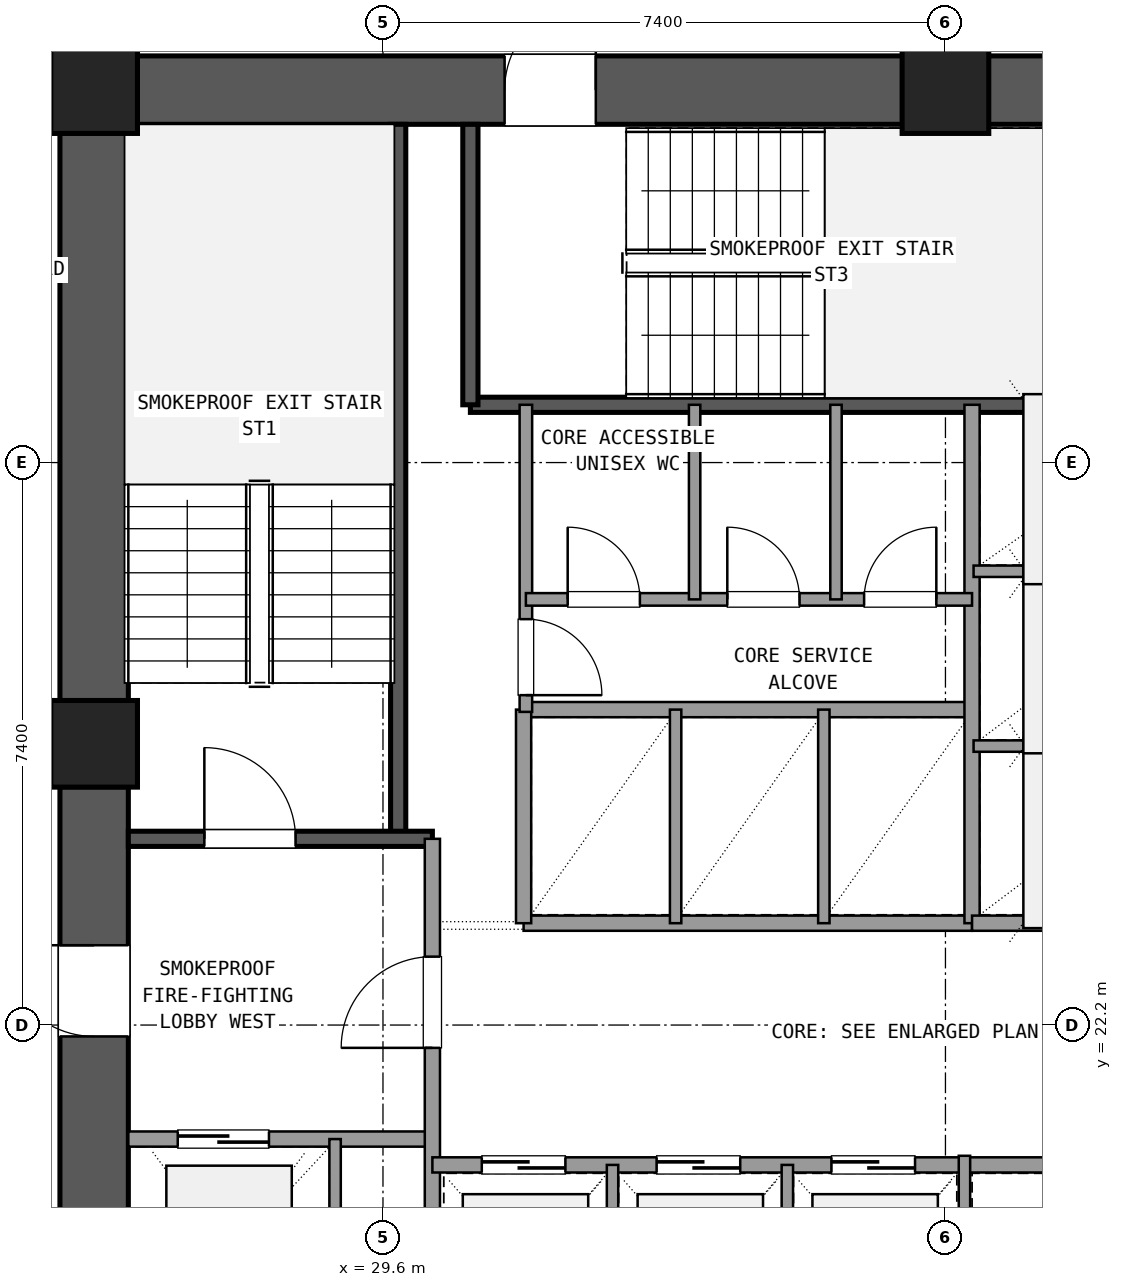
"""IFC4 building model, lengths in metres.
Left out: names, types, materials, properties, quantities, classifications, styles, units other than length and angle.
Written with IfcOpenShell. Run it as: python <this file> out.ifc"""

import sys

from ifc_helpers import new_model, si_unit, direction, frame, frame_2d, origin, origin_2d, place, context, subcontext, project, spatial, rectangle, extrude, element, fill, save


model = new_model("IFC4")
c1 = context("Model", 3, precision=1e-05, world=origin(), true_north=direction((0.0, 1.0)))
c2 = subcontext(c1, "Body", "Model", "MODEL_VIEW")
j1 = project(units=[si_unit("LENGTHUNIT", "METRE"), si_unit("PLANEANGLEUNIT", "RADIAN")], contexts=[c1])
p1 = place(None, origin())
s1 = spatial("IfcSite", under=j1, at=p1, CompositionType="ELEMENT")
p2 = place(p1, origin())
s2 = spatial("IfcBuilding", under=s1, at=p2, CompositionType="ELEMENT")
p3 = place(p2, frame((0.0, 0.0, 52.74)))
s3 = spatial("IfcBuildingStorey", under=s2, at=p3, CompositionType="ELEMENT", Elevation=52.74)
for number, where, z_axis, x_axis in (
    (1, (37.0, 34.5, 0.0), (0.0, 0.0, 1.0), (1.0, 0.0, 0.0)),
    (2, (25.8, 34.5, 0.0), (0.0, 0.0, 1.0), (1.0, 0.0, 0.0)),
    (3, (25.8, 25.9, 0.0), (0.0, 0.0, 1.0), (1.0, 0.0, 0.0)),
):
    element("IfcColumn", number, at=place(p3, frame(where, z_axis=z_axis, x_axis=x_axis)), inside=s3, PredefinedType="COLUMN", context=c2, shape_type="SweptSolid", body=[
        extrude(rectangle(XDim=1.14, YDim=1.14, at=origin_2d()), origin(), (0.0, 0.0, 1.0), 3.6),
    ])
p4 = place(p3, frame((47.635, 34.5, 0.0), z_axis=(0.0, 0.0, 1.0), x_axis=(-1.0, 0.0, 0.0)))
e4 = element("IfcWall", 4, at=p4, inside=s3, PredefinedType="SHEAR", context=c2, shape_type="SweptSolid", body=[
    extrude(rectangle(XDim=10.07, YDim=0.9, at=frame_2d((5.035, 0.0))), origin(), (0.0, 0.0, 1.0), 3.32),
])
p5 = place(p4, frame((4.535, 0.0, 0.0)))
e5 = element("IfcOpeningElement", 5, at=p5, cuts=e4, PredefinedType="OPENING", context=c2, shape_type="SweptSolid", body=[
    extrude(rectangle(XDim=1.6, YDim=2.2, at=frame_2d((0.8, 1.1))), frame((0.0, 0.46, 0.0), z_axis=(0.0, -1.0, 0.0), x_axis=(1.0, 0.0, 0.0)), (0.0, 0.0, 1.0), 0.92),
])
p6 = place(p3, frame((36.435, 34.5, 0.0), z_axis=(0.0, 0.0, 1.0), x_axis=(-1.0, 0.0, 0.0)))
e6 = element("IfcWall", 6, at=p6, inside=s3, PredefinedType="SHEAR", context=c2, shape_type="SweptSolid", body=[
    extrude(rectangle(XDim=10.07, YDim=0.9, at=frame_2d((5.035, 0.0))), origin(), (0.0, 0.0, 1.0), 3.32),
])
p7 = place(p6, frame((4.035, 0.0, 0.0)))
e7 = element("IfcOpeningElement", 7, at=p7, cuts=e6, PredefinedType="OPENING", context=c2, shape_type="SweptSolid", body=[
    extrude(rectangle(XDim=1.2, YDim=2.15, at=frame_2d((0.6, 1.075))), frame((0.0, 0.46, 0.0), z_axis=(0.0, -1.0, 0.0), x_axis=(1.0, 0.0, 0.0)), (0.0, 0.0, 1.0), 0.92),
])
p8 = place(p3, frame((25.8, 33.935, 0.0), z_axis=(0.0, 0.0, 1.0), x_axis=(0.0, -1.0, 0.0)))
e8 = element("IfcWall", 8, at=p8, inside=s3, PredefinedType="SHEAR", context=c2, shape_type="SweptSolid", body=[
    extrude(rectangle(XDim=7.47, YDim=0.9, at=frame_2d((3.735, 0.0))), origin(), (0.0, 0.0, 1.0), 3.32),
])
p9 = place(p3, frame((25.8, 25.335, 0.0), z_axis=(0.0, 0.0, 1.0), x_axis=(0.0, -1.0, 0.0)))
e9 = element("IfcWall", 9, at=p9, inside=s3, PredefinedType="SHEAR", context=c2, shape_type="SweptSolid", body=[
    extrude(rectangle(XDim=7.47, YDim=0.9, at=frame_2d((3.735, 0.0))), origin(), (0.0, 0.0, 1.0), 3.32),
])
p10 = place(p9, frame((2.085, 0.0, 0.0)))
e10 = element("IfcOpeningElement", 10, at=p10, cuts=e9, PredefinedType="OPENING", context=c2, shape_type="SweptSolid", body=[
    extrude(rectangle(XDim=1.2, YDim=2.15, at=frame_2d((0.6, 1.075))), frame((0.0, 0.46, 0.0), z_axis=(0.0, -1.0, 0.0), x_axis=(1.0, 0.0, 0.0)), (0.0, 0.0, 1.0), 0.92),
])
p11 = place(p3, frame((29.8, 24.65, 0.0), z_axis=(0.0, 0.0, 1.0), x_axis=(0.0, 1.0, 0.0)))
e11 = element("IfcWall", 11, at=p11, inside=s3, PredefinedType="SHEAR", context=c2, shape_type="SweptSolid", body=[
    extrude(rectangle(XDim=9.4, YDim=0.2, at=frame_2d((4.7, 0.0))), origin(), (0.0, 0.0, 1.0), 3.32),
])
p12 = place(p3, frame((26.25, 24.65, 0.0), z_axis=(0.0, 0.0, 1.0), x_axis=(1.0, 0.0, 0.0)))
e12 = element("IfcWall", 12, at=p12, inside=s3, PredefinedType="SHEAR", context=c2, shape_type="SweptSolid", body=[
    extrude(rectangle(XDim=4.0, YDim=0.2, at=frame_2d((2.0, 0.0))), origin(), (0.0, 0.0, 1.0), 3.32),
])
p13 = place(p12, frame((1.0, 0.0, 0.0)))
e13 = element("IfcOpeningElement", 13, at=p13, cuts=e12, PredefinedType="OPENING", context=c2, shape_type="SweptSolid", body=[
    extrude(rectangle(XDim=1.2, YDim=2.15, at=frame_2d((0.6, 1.075))), frame((0.0, 0.11, 0.0), z_axis=(0.0, -1.0, 0.0), x_axis=(1.0, 0.0, 0.0)), (0.0, 0.0, 1.0), 0.22),
])
p14 = place(p3, frame((30.75, 30.36, 0.0), z_axis=(0.0, 0.0, 1.0), x_axis=(1.0, 0.0, 0.0)))
e14 = element("IfcWall", 14, at=p14, inside=s3, PredefinedType="SHEAR", context=c2, shape_type="SweptSolid", body=[
    extrude(rectangle(XDim=9.5, YDim=0.2, at=frame_2d((4.75, 0.0))), origin(), (0.0, 0.0, 1.0), 3.32),
])
p15 = place(p3, frame((30.75, 30.36, 0.0), z_axis=(0.0, 0.0, 1.0), x_axis=(0.0, 1.0, 0.0)))
e15 = element("IfcWall", 15, at=p15, inside=s3, PredefinedType="SHEAR", context=c2, shape_type="SweptSolid", body=[
    extrude(rectangle(XDim=3.69, YDim=0.2, at=frame_2d((1.845, 0.0))), origin(), (0.0, 0.0, 1.0), 3.32),
])
p16 = place(p3, frame((26.25, 20.7, 0.0), z_axis=(0.0, 0.0, 1.0), x_axis=(1.0, 0.0, 0.0)))
e16 = element("IfcWall", 16, at=p16, inside=s3, PredefinedType="SOLIDWALL", context=c2, shape_type="SweptSolid", body=[
    extrude(rectangle(XDim=4.0, YDim=0.2, at=frame_2d((2.0, 0.0))), origin(), (0.0, 0.0, 1.0), 2.61),
])
p17 = place(p16, frame((0.65, 0.0, 0.0)))
e17 = element("IfcOpeningElement", 17, at=p17, cuts=e16, PredefinedType="OPENING", context=c2, shape_type="SweptSolid", body=[
    extrude(rectangle(XDim=1.2, YDim=2.15, at=frame_2d((0.6, 1.075))), frame((0.0, 0.11, 0.0), z_axis=(0.0, -1.0, 0.0), x_axis=(1.0, 0.0, 0.0)), (0.0, 0.0, 1.0), 0.22),
])
p18 = place(p3, frame((30.25, 17.75, 0.0), z_axis=(0.0, 0.0, 1.0), x_axis=(0.0, 1.0, 0.0)))
e18 = element("IfcWall", 18, at=p18, inside=s3, PredefinedType="SOLIDWALL", context=c2, shape_type="SweptSolid", body=[
    extrude(rectangle(XDim=6.9, YDim=0.2, at=frame_2d((3.45, 0.0))), origin(), (0.0, 0.0, 1.0), 2.61),
])
p19 = place(p18, frame((4.15, 0.0, 0.0)))
e19 = element("IfcOpeningElement", 19, at=p19, cuts=e18, PredefinedType="OPENING", context=c2, shape_type="SweptSolid", body=[
    extrude(rectangle(XDim=1.2, YDim=2.15, at=frame_2d((0.6, 1.075))), frame((0.0, 0.11, 0.0), z_axis=(0.0, -1.0, 0.0), x_axis=(1.0, 0.0, 0.0)), (0.0, 0.0, 1.0), 0.22),
])
p20 = place(p3, frame((28.97, 17.75, 0.0), z_axis=(0.0, 0.0, 1.0), x_axis=(0.0, 1.0, 0.0)))
e20 = element("IfcWall", 20, at=p20, inside=s3, PredefinedType="PARTITIONING", context=c2, shape_type="SweptSolid", body=[
    extrude(rectangle(XDim=2.95, YDim=0.15, at=frame_2d((1.475, 0.0))), origin(), (0.0, 0.0, 1.0), 2.61),
])
p21 = place(p3, frame((30.25, 20.36, 0.0), z_axis=(0.0, 0.0, 1.0), x_axis=(1.0, 0.0, 0.0)))
e21 = element("IfcWall", 21, at=p21, inside=s3, PredefinedType="SOLIDWALL", context=c2, shape_type="SweptSolid", body=[
    extrude(rectangle(XDim=7.0, YDim=0.2, at=frame_2d((3.5, 0.0))), origin(), (0.0, 0.0, 1.0), 2.61),
])
p22 = place(p21, frame((0.65, 0.0, 0.0)))
e22 = element("IfcOpeningElement", 22, at=p22, cuts=e21, PredefinedType="OPENING", context=c2, shape_type="SweptSolid", body=[
    extrude(rectangle(XDim=1.1, YDim=2.15, at=frame_2d((0.55, 1.075))), frame((0.0, 0.11, 0.0), z_axis=(0.0, -1.0, 0.0), x_axis=(1.0, 0.0, 0.0)), (0.0, 0.0, 1.0), 0.22),
])
p23 = place(p21, frame((2.95, 0.0, 0.0)))
e23 = element("IfcOpeningElement", 23, at=p23, cuts=e21, PredefinedType="OPENING", context=c2, shape_type="SweptSolid", body=[
    extrude(rectangle(XDim=1.1, YDim=2.15, at=frame_2d((0.55, 1.075))), frame((0.0, 0.11, 0.0), z_axis=(0.0, -1.0, 0.0), x_axis=(1.0, 0.0, 0.0)), (0.0, 0.0, 1.0), 0.22),
])
p24 = place(p21, frame((5.25, 0.0, 0.0)))
e24 = element("IfcOpeningElement", 24, at=p24, cuts=e21, PredefinedType="OPENING", context=c2, shape_type="SweptSolid", body=[
    extrude(rectangle(XDim=1.1, YDim=2.15, at=frame_2d((0.55, 1.075))), frame((0.0, 0.11, 0.0), z_axis=(0.0, -1.0, 0.0), x_axis=(1.0, 0.0, 0.0)), (0.0, 0.0, 1.0), 0.22),
])
for number, where, z_axis, x_axis in (
    (25, (32.62, 17.75, 0.0), (0.0, 0.0, 1.0), (0.0, 1.0, 0.0)),
    (26, (34.92, 17.75, 0.0), (0.0, 0.0, 1.0), (0.0, 1.0, 0.0)),
):
    element("IfcWall", number, at=place(p3, frame(where, z_axis=z_axis, x_axis=x_axis)), inside=s3, PredefinedType="PARTITIONING", context=c2, shape_type="SweptSolid", body=[
        extrude(rectangle(XDim=2.61, YDim=0.15, at=frame_2d((1.305, 0.0))), origin(), (0.0, 0.0, 1.0), 2.61),
    ])
p25 = place(p3, frame((37.25, 20.36, 0.0), z_axis=(0.0, 0.0, 1.0), x_axis=(1.0, 0.0, 0.0)))
e27 = element("IfcWall", 27, at=p25, inside=s3, PredefinedType="SOLIDWALL", context=c2, shape_type="SweptSolid", body=[
    extrude(rectangle(XDim=6.1, YDim=0.2, at=frame_2d((3.05, 0.0))), origin(), (0.0, 0.0, 1.0), 2.61),
])
p26 = place(p3, frame((37.25, 17.75, 0.0), z_axis=(0.0, 0.0, 1.0), x_axis=(0.0, 1.0, 0.0)))
e28 = element("IfcWall", 28, at=p26, inside=s3, PredefinedType="PARTITIONING", context=c2, shape_type="SweptSolid", body=[
    extrude(rectangle(XDim=2.73, YDim=0.15, at=frame_2d((1.365, 0.0))), origin(), (0.0, 0.0, 1.0), 2.61),
])
for number, where, z_axis, x_axis in (
    (29, (31.45, 23.54, 0.0), (0.0, 0.0, 1.0), (1.0, 0.0, 0.0)),
    (30, (31.45, 26.35, 0.0), (0.0, 0.0, 1.0), (1.0, 0.0, 0.0)),
):
    element("IfcWall", number, at=place(p3, frame(where, z_axis=z_axis, x_axis=x_axis)), inside=s3, PredefinedType="SOLIDWALL", context=c2, shape_type="SweptSolid", body=[
        extrude(rectangle(XDim=5.9, YDim=0.2, at=frame_2d((2.95, 0.0))), origin(), (0.0, 0.0, 1.0), 2.61),
    ])
p27 = place(p3, frame((31.45, 23.54, 0.0), z_axis=(0.0, 0.0, 1.0), x_axis=(0.0, 1.0, 0.0)))
e31 = element("IfcWall", 31, at=p27, inside=s3, PredefinedType="SOLIDWALL", context=c2, shape_type="SweptSolid", body=[
    extrude(rectangle(XDim=2.81, YDim=0.2, at=frame_2d((1.405, 0.0))), origin(), (0.0, 0.0, 1.0), 2.61),
])
for number, where, z_axis, x_axis in (
    (32, (33.45, 23.54, 0.0), (0.0, 0.0, 1.0), (0.0, 1.0, 0.0)),
    (33, (35.4, 23.54, 0.0), (0.0, 0.0, 1.0), (0.0, 1.0, 0.0)),
):
    element("IfcWall", number, at=place(p3, frame(where, z_axis=z_axis, x_axis=x_axis)), inside=s3, PredefinedType="PARTITIONING", context=c2, shape_type="SweptSolid", body=[
        extrude(rectangle(XDim=2.81, YDim=0.15, at=frame_2d((1.405, 0.0))), origin(), (0.0, 0.0, 1.0), 2.61),
    ])
p28 = place(p3, frame((37.35, 23.54, 0.0), z_axis=(0.0, 0.0, 1.0), x_axis=(0.0, 1.0, 0.0)))
e34 = element("IfcWall", 34, at=p28, inside=s3, PredefinedType="SOLIDWALL", context=c2, shape_type="SweptSolid", body=[
    extrude(rectangle(XDim=6.82, YDim=0.2, at=frame_2d((3.41, 0.0))), origin(), (0.0, 0.0, 1.0), 2.61),
])
p29 = place(p3, frame((37.35, 23.54, 0.0), z_axis=(0.0, 0.0, 1.0), x_axis=(1.0, 0.0, 0.0)))
e35 = element("IfcWall", 35, at=p29, inside=s3, PredefinedType="SOLIDWALL", context=c2, shape_type="SweptSolid", body=[
    extrude(rectangle(XDim=3.05, YDim=0.2, at=frame_2d((1.525, 0.0))), origin(), (0.0, 0.0, 1.0), 2.61),
])
for number, where, z_axis, x_axis in (
    (36, (37.37, 25.87, 0.0), (0.0, 0.0, 1.0), (1.0, 0.0, 0.0)),
    (37, (37.37, 28.17, 0.0), (0.0, 0.0, 1.0), (1.0, 0.0, 0.0)),
):
    element("IfcWall", number, at=place(p3, frame(where, z_axis=z_axis, x_axis=x_axis)), inside=s3, PredefinedType="PARTITIONING", context=c2, shape_type="SweptSolid", body=[
        extrude(rectangle(XDim=3.01, YDim=0.15, at=frame_2d((1.505, 0.0))), origin(), (0.0, 0.0, 1.0), 2.61),
    ])
p30 = place(p3, frame((31.48, 26.32, 0.0), z_axis=(0.0, 0.0, 1.0), x_axis=(0.0, 1.0, 0.0)))
e38 = element("IfcWall", 38, at=p30, inside=s3, PredefinedType="PLUMBINGWALL", context=c2, shape_type="SweptSolid", body=[
    extrude(rectangle(XDim=4.04, YDim=0.165, at=frame_2d((2.02, 0.0))), origin(), (0.0, 0.0, 1.0), 2.61),
])
p31 = place(p30, frame((0.22, 0.0, 0.0)))
e39 = element("IfcOpeningElement", 39, at=p31, cuts=e38, PredefinedType="OPENING", context=c2, shape_type="SweptSolid", body=[
    extrude(rectangle(XDim=1.0, YDim=2.15, at=frame_2d((0.5, 1.075))), frame((0.0, 0.093, 0.0), z_axis=(0.0, -1.0, 0.0), x_axis=(1.0, 0.0, 0.0)), (0.0, 0.0, 1.0), 0.185),
])
p32 = place(p3, frame((31.48, 27.8, 0.0), z_axis=(0.0, 0.0, 1.0), x_axis=(1.0, 0.0, 0.0)))
e40 = element("IfcWall", 40, at=p32, inside=s3, PredefinedType="PLUMBINGWALL", context=c2, shape_type="SweptSolid", body=[
    extrude(rectangle(XDim=5.87, YDim=0.165, at=frame_2d((2.935, 0.0))), origin(), (0.0, 0.0, 1.0), 2.61),
])
p33 = place(p32, frame((0.55, 0.0, 0.0)))
e41 = element("IfcOpeningElement", 41, at=p33, cuts=e40, PredefinedType="OPENING", context=c2, shape_type="SweptSolid", body=[
    extrude(rectangle(XDim=0.95, YDim=2.1, at=frame_2d((0.475, 1.05))), frame((0.0, 0.093, 0.0), z_axis=(0.0, -1.0, 0.0), x_axis=(1.0, 0.0, 0.0)), (0.0, 0.0, 1.0), 0.185),
])
p34 = place(p32, frame((2.65, 0.0, 0.0)))
e42 = element("IfcOpeningElement", 42, at=p34, cuts=e40, PredefinedType="OPENING", context=c2, shape_type="SweptSolid", body=[
    extrude(rectangle(XDim=0.95, YDim=2.1, at=frame_2d((0.475, 1.05))), frame((0.0, 0.093, 0.0), z_axis=(0.0, -1.0, 0.0), x_axis=(1.0, 0.0, 0.0)), (0.0, 0.0, 1.0), 0.185),
])
p35 = place(p32, frame((4.45, 0.0, 0.0)))
e43 = element("IfcOpeningElement", 43, at=p35, cuts=e40, PredefinedType="OPENING", context=c2, shape_type="SweptSolid", body=[
    extrude(rectangle(XDim=0.95, YDim=2.1, at=frame_2d((0.475, 1.05))), frame((0.0, 0.093, 0.0), z_axis=(0.0, -1.0, 0.0), x_axis=(1.0, 0.0, 0.0)), (0.0, 0.0, 1.0), 0.185),
])
for number, where, z_axis, x_axis in (
    (44, (33.7, 27.8, 0.0), (0.0, 0.0, 1.0), (0.0, 1.0, 0.0)),
    (45, (35.56, 27.8, 0.0), (0.0, 0.0, 1.0), (0.0, 1.0, 0.0)),
):
    element("IfcWall", number, at=place(p3, frame(where, z_axis=z_axis, x_axis=x_axis)), inside=s3, PredefinedType="PARTITIONING", context=c2, shape_type="SweptSolid", body=[
        extrude(rectangle(XDim=2.56, YDim=0.15, at=frame_2d((1.28, 0.0))), origin(), (0.0, 0.0, 1.0), 2.61),
    ])
p36 = place(p3, frame((37.0, 34.95, 0.0), z_axis=(0.0, 0.0, 1.0), x_axis=(0.0, 1.0, 0.0)))
e46 = element("IfcWall", 46, at=p36, inside=s3, PredefinedType="PARTITIONING", context=c2, shape_type="SweptSolid", body=[
    extrude(rectangle(XDim=2.7, YDim=0.18, at=frame_2d((1.35, 0.0))), origin(), (0.0, 0.0, 1.0), 2.61),
])
p37 = place(p36, frame((0.35, 0.0, 0.0)))
e47 = element("IfcOpeningElement", 47, at=p37, cuts=e46, PredefinedType="OPENING", context=c2, shape_type="SweptSolid", body=[
    extrude(rectangle(XDim=2.0, YDim=2.2, at=frame_2d((1.0, 1.1))), frame((0.0, 0.1, 0.0), z_axis=(0.0, -1.0, 0.0), x_axis=(1.0, 0.0, 0.0)), (0.0, 0.0, 1.0), 0.2),
])
p38 = place(p13, origin())
e48 = element("IfcDoor", 48, at=p38, inside=s3, OperationType="SINGLE_SWING_LEFT", PredefinedType="DOOR", context=c2, shape_type="SweptSolid", body=[
    extrude(rectangle(XDim=1.2, YDim=2.15, at=frame_2d((0.6, 1.075))), frame((0.0, 0.025, 0.0), z_axis=(0.0, -1.0, 0.0), x_axis=(1.0, 0.0, 0.0)), (0.0, 0.0, 1.0), 0.05),
])
fill(e13, e48)
p39 = place(p17, origin())
e49 = element("IfcDoor", 49, at=p39, inside=s3, OperationType="SLIDING_TO_LEFT", PredefinedType="DOOR", context=c2, shape_type="SweptSolid", body=[
    extrude(rectangle(XDim=1.2, YDim=2.15, at=frame_2d((0.6, 1.075))), frame((0.0, 0.025, 0.0), z_axis=(0.0, -1.0, 0.0), x_axis=(1.0, 0.0, 0.0)), (0.0, 0.0, 1.0), 0.05),
])
fill(e17, e49)
p40 = place(p19, origin())
e50 = element("IfcDoor", 50, at=p40, inside=s3, OperationType="SINGLE_SWING_LEFT", PredefinedType="DOOR", context=c2, shape_type="SweptSolid", body=[
    extrude(rectangle(XDim=1.2, YDim=2.15, at=frame_2d((0.6, 1.075))), frame((0.0, 0.025, 0.0), z_axis=(0.0, -1.0, 0.0), x_axis=(1.0, 0.0, 0.0)), (0.0, 0.0, 1.0), 0.05),
])
fill(e19, e50)
p41 = place(p10, frame((1.2, 0.0, 0.0), z_axis=(0.0, 0.0, 1.0), x_axis=(-1.0, 0.0, 0.0)))
e51 = element("IfcDoor", 51, at=p41, inside=s3, OperationType="SINGLE_SWING_LEFT", PredefinedType="DOOR", context=c2, shape_type="SweptSolid", body=[
    extrude(rectangle(XDim=1.2, YDim=2.15, at=frame_2d((0.6, 1.075))), frame((0.0, 0.025, 0.0), z_axis=(0.0, -1.0, 0.0), x_axis=(1.0, 0.0, 0.0)), (0.0, 0.0, 1.0), 0.05),
])
fill(e10, e51)
p42 = place(p7, frame((1.2, 0.0, 0.0), z_axis=(0.0, 0.0, 1.0), x_axis=(-1.0, 0.0, 0.0)))
e52 = element("IfcDoor", 52, at=p42, inside=s3, OperationType="SINGLE_SWING_LEFT", PredefinedType="DOOR", context=c2, shape_type="SweptSolid", body=[
    extrude(rectangle(XDim=1.2, YDim=2.15, at=frame_2d((0.6, 1.075))), frame((0.0, 0.025, 0.0), z_axis=(0.0, -1.0, 0.0), x_axis=(1.0, 0.0, 0.0)), (0.0, 0.0, 1.0), 0.05),
])
fill(e7, e52)
p43 = place(p22, origin())
e53 = element("IfcDoor", 53, at=p43, inside=s3, OperationType="SLIDING_TO_LEFT", PredefinedType="DOOR", context=c2, shape_type="SweptSolid", body=[
    extrude(rectangle(XDim=1.1, YDim=2.15, at=frame_2d((0.55, 1.075))), frame((0.0, 0.025, 0.0), z_axis=(0.0, -1.0, 0.0), x_axis=(1.0, 0.0, 0.0)), (0.0, 0.0, 1.0), 0.05),
])
fill(e22, e53)
p44 = place(p23, origin())
e54 = element("IfcDoor", 54, at=p44, inside=s3, OperationType="SLIDING_TO_LEFT", PredefinedType="DOOR", context=c2, shape_type="SweptSolid", body=[
    extrude(rectangle(XDim=1.1, YDim=2.15, at=frame_2d((0.55, 1.075))), frame((0.0, 0.025, 0.0), z_axis=(0.0, -1.0, 0.0), x_axis=(1.0, 0.0, 0.0)), (0.0, 0.0, 1.0), 0.05),
])
fill(e23, e54)
p45 = place(p24, origin())
e55 = element("IfcDoor", 55, at=p45, inside=s3, OperationType="SLIDING_TO_LEFT", PredefinedType="DOOR", context=c2, shape_type="SweptSolid", body=[
    extrude(rectangle(XDim=1.1, YDim=2.15, at=frame_2d((0.55, 1.075))), frame((0.0, 0.025, 0.0), z_axis=(0.0, -1.0, 0.0), x_axis=(1.0, 0.0, 0.0)), (0.0, 0.0, 1.0), 0.05),
])
fill(e24, e55)
p46 = place(p31, frame((1.0, 0.0, 0.0), z_axis=(0.0, 0.0, 1.0), x_axis=(-1.0, 0.0, 0.0)))
e56 = element("IfcDoor", 56, at=p46, inside=s3, OperationType="SINGLE_SWING_LEFT", PredefinedType="DOOR", context=c2, shape_type="SweptSolid", body=[
    extrude(rectangle(XDim=1.0, YDim=2.15, at=frame_2d((0.5, 1.075))), frame((0.0, 0.025, 0.0), z_axis=(0.0, -1.0, 0.0), x_axis=(1.0, 0.0, 0.0)), (0.0, 0.0, 1.0), 0.05),
])
fill(e39, e56)
p47 = place(p33, origin())
e57 = element("IfcDoor", 57, at=p47, inside=s3, OperationType="SINGLE_SWING_LEFT", PredefinedType="DOOR", context=c2, shape_type="SweptSolid", body=[
    extrude(rectangle(XDim=0.95, YDim=2.1, at=frame_2d((0.475, 1.05))), frame((0.0, 0.025, 0.0), z_axis=(0.0, -1.0, 0.0), x_axis=(1.0, 0.0, 0.0)), (0.0, 0.0, 1.0), 0.05),
])
fill(e41, e57)
p48 = place(p34, origin())
e58 = element("IfcDoor", 58, at=p48, inside=s3, OperationType="SINGLE_SWING_LEFT", PredefinedType="DOOR", context=c2, shape_type="SweptSolid", body=[
    extrude(rectangle(XDim=0.95, YDim=2.1, at=frame_2d((0.475, 1.05))), frame((0.0, 0.025, 0.0), z_axis=(0.0, -1.0, 0.0), x_axis=(1.0, 0.0, 0.0)), (0.0, 0.0, 1.0), 0.05),
])
fill(e42, e58)
p49 = place(p35, origin())
e59 = element("IfcDoor", 59, at=p49, inside=s3, OperationType="SINGLE_SWING_RIGHT", PredefinedType="DOOR", context=c2, shape_type="SweptSolid", body=[
    extrude(rectangle(XDim=0.95, YDim=2.1, at=frame_2d((0.475, 1.05))), frame((0.0, 0.025, 0.0), z_axis=(0.0, -1.0, 0.0), x_axis=(1.0, 0.0, 0.0)), (0.0, 0.0, 1.0), 0.05),
])
fill(e43, e59)
save(model, sys.argv[1])
